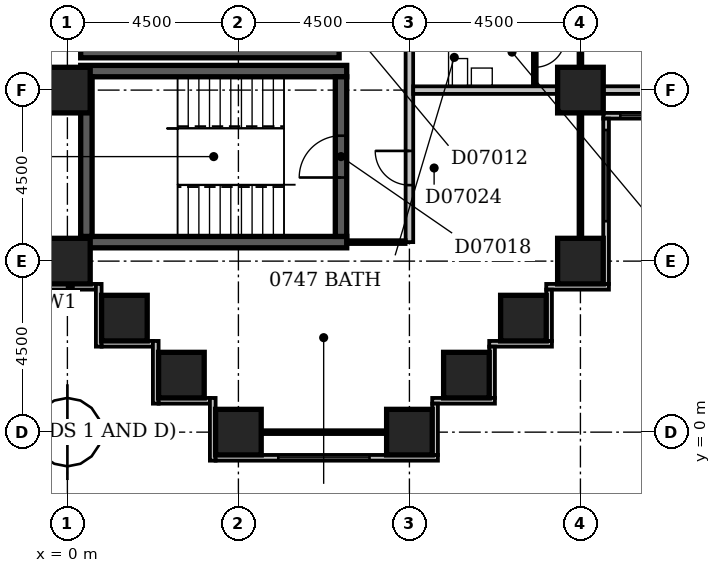
"""IFC4 building model, lengths in metres.
Left out: names, types, materials, properties, quantities, classifications, styles, units other than length and angle.
Written with IfcOpenShell. Run it as: python <this file> out.ifc"""

import sys

from ifc_helpers import new_model, si_unit, direction, frame, frame_2d, origin, origin_2d, place, context, subcontext, project, spatial, rectangle, extrude, element, fill, save


model = new_model("IFC4")
c1 = context("Model", 3, precision=1e-05, world=origin(), true_north=direction((0.0, 1.0)))
c2 = subcontext(c1, "Body", "Model", "MODEL_VIEW")
j1 = project(units=[si_unit("LENGTHUNIT", "METRE"), si_unit("PLANEANGLEUNIT", "RADIAN")], contexts=[c1])
p1 = place(None, origin())
s1 = spatial("IfcSite", under=j1, at=p1, CompositionType="ELEMENT")
p2 = place(p1, origin())
s2 = spatial("IfcBuilding", under=s1, at=p2, CompositionType="ELEMENT")
p3 = place(p2, frame((0.0, 0.0, 36.2)))
s3 = spatial("IfcBuildingStorey", under=s2, at=p3, CompositionType="ELEMENT", Elevation=36.2)
for number, where, z_axis, x_axis in (
    (1, (0.35, 5.0, -0.3), (0.0, 0.0, 1.0), (1.0, 0.0, 0.0)),
    (2, (0.35, 9.5, -0.3), (0.0, 0.0, 1.0), (1.0, 0.0, 0.0)),
):
    element("IfcWall", number, at=place(p3, frame(where, z_axis=z_axis, x_axis=x_axis)), inside=s3, PredefinedType="SHEAR", context=c2, shape_type="SweptSolid", body=[
        extrude(rectangle(XDim=7.0, YDim=0.3, at=frame_2d((3.5, 0.0))), origin(), (0.0, 0.0, 1.0), 3.6),
    ])
p4 = place(p3, frame((0.35, 10.0, -0.3), z_axis=(0.0, 0.0, 1.0), x_axis=(1.0, 0.0, 0.0)))
e3 = element("IfcWall", 3, at=p4, inside=s3, PredefinedType="SHEAR", context=c2, shape_type="SweptSolid", body=[
    extrude(rectangle(XDim=6.8, YDim=0.3, at=frame_2d((3.4, 0.0))), origin(), (0.0, 0.0, 1.0), 3.6),
])
p5 = place(p3, frame((0.5, 5.15, -0.3), z_axis=(0.0, 0.0, 1.0), x_axis=(0.0, 1.0, 0.0)))
e4 = element("IfcWall", 4, at=p5, inside=s3, PredefinedType="SHEAR", context=c2, shape_type="SweptSolid", body=[
    extrude(rectangle(XDim=4.2, YDim=0.3, at=frame_2d((2.1, 0.0))), origin(), (0.0, 0.0, 1.0), 3.6),
])
p6 = place(p3, frame((7.2, 5.15, -0.3), z_axis=(0.0, 0.0, 1.0), x_axis=(0.0, 1.0, 0.0)))
e5 = element("IfcWall", 5, at=p6, inside=s3, PredefinedType="SHEAR", context=c2, shape_type="SweptSolid", body=[
    extrude(rectangle(XDim=4.2, YDim=0.3, at=frame_2d((2.1, 0.0))), origin(), (0.0, 0.0, 1.0), 3.6),
])
p7 = place(p6, frame((1.55, 0.0, 0.3)))
e6 = element("IfcOpeningElement", 6, at=p7, cuts=e5, PredefinedType="OPENING", context=c2, shape_type="SweptSolid", body=[
    extrude(rectangle(XDim=1.1, YDim=2.1, at=frame_2d((0.55, 1.05))), frame((0.0, 0.162, 0.0), z_axis=(0.0, -1.0, 0.0), x_axis=(1.0, 0.0, 0.0)), (0.0, 0.0, 1.0), 0.324),
])
for number, where, z_axis, x_axis in (
    (7, (4.5, 0.0, -0.3), (0.0, 0.0, 1.0), (1.0, 0.0, 0.0)),
    (8, (9.0, 0.0, -0.3), (0.0, 0.0, 1.0), (1.0, 0.0, 0.0)),
    (9, (3.0, 1.5, -0.3), (0.0, 0.0, 1.0), (1.0, 0.0, 0.0)),
    (10, (10.5, 1.5, -0.3), (0.0, 0.0, 1.0), (1.0, 0.0, 0.0)),
    (11, (1.5, 3.0, -0.3), (0.0, 0.0, 1.0), (1.0, 0.0, 0.0)),
    (12, (12.0, 3.0, -0.3), (0.0, 0.0, 1.0), (1.0, 0.0, 0.0)),
    (13, (0.0, 4.5, -0.3), (0.0, 0.0, 1.0), (1.0, 0.0, 0.0)),
    (14, (13.5, 4.5, -0.3), (0.0, 0.0, 1.0), (1.0, 0.0, 0.0)),
    (15, (0.0, 9.0, -0.3), (0.0, 0.0, 1.0), (1.0, 0.0, 0.0)),
    (16, (13.5, 9.0, -0.3), (0.0, 0.0, 1.0), (1.0, 0.0, 0.0)),
):
    element("IfcColumn", number, at=place(p3, frame(where, z_axis=z_axis, x_axis=x_axis)), inside=s3, PredefinedType="COLUMN", context=c2, shape_type="SweptSolid", body=[
        extrude(rectangle(XDim=1.2, YDim=1.2, at=origin_2d()), origin(), (0.0, 0.0, 1.0), 3.6),
    ])
p8 = place(p3, frame((9.675, -0.6, 0.0), z_axis=(0.0, 0.0, 1.0), x_axis=(0.0, 1.0, 0.0)))
e17 = element("IfcWall", 17, at=p8, inside=s3, PredefinedType="STANDARD", context=c2, shape_type="SweptSolid", body=[
    extrude(rectangle(XDim=1.35, YDim=0.15, at=frame_2d((0.675, 0.0))), origin(), (0.0, 0.0, 1.0), 2.7),
])
p9 = place(p3, frame((9.6, 0.825, 0.0), z_axis=(0.0, 0.0, 1.0), x_axis=(1.0, 0.0, 0.0)))
e18 = element("IfcWall", 18, at=p9, inside=s3, PredefinedType="STANDARD", context=c2, shape_type="SweptSolid", body=[
    extrude(rectangle(XDim=1.65, YDim=0.15, at=frame_2d((0.825, 0.0))), origin(), (0.0, 0.0, 1.0), 2.7),
])
p10 = place(p3, frame((11.175, 0.9, 0.0), z_axis=(0.0, 0.0, 1.0), x_axis=(0.0, 1.0, 0.0)))
e19 = element("IfcWall", 19, at=p10, inside=s3, PredefinedType="STANDARD", context=c2, shape_type="SweptSolid", body=[
    extrude(rectangle(XDim=1.35, YDim=0.15, at=frame_2d((0.675, 0.0))), origin(), (0.0, 0.0, 1.0), 2.7),
])
p11 = place(p3, frame((11.1, 2.325, 0.0), z_axis=(0.0, 0.0, 1.0), x_axis=(1.0, 0.0, 0.0)))
e20 = element("IfcWall", 20, at=p11, inside=s3, PredefinedType="STANDARD", context=c2, shape_type="SweptSolid", body=[
    extrude(rectangle(XDim=1.65, YDim=0.15, at=frame_2d((0.825, 0.0))), origin(), (0.0, 0.0, 1.0), 2.7),
])
p12 = place(p3, frame((12.675, 2.4, 0.0), z_axis=(0.0, 0.0, 1.0), x_axis=(0.0, 1.0, 0.0)))
e21 = element("IfcWall", 21, at=p12, inside=s3, PredefinedType="STANDARD", context=c2, shape_type="SweptSolid", body=[
    extrude(rectangle(XDim=1.35, YDim=0.15, at=frame_2d((0.675, 0.0))), origin(), (0.0, 0.0, 1.0), 2.7),
])
p13 = place(p3, frame((12.6, 3.825, 0.0), z_axis=(0.0, 0.0, 1.0), x_axis=(1.0, 0.0, 0.0)))
e22 = element("IfcWall", 22, at=p13, inside=s3, PredefinedType="STANDARD", context=c2, shape_type="SweptSolid", body=[
    extrude(rectangle(XDim=1.65, YDim=0.15, at=frame_2d((0.825, 0.0))), origin(), (0.0, 0.0, 1.0), 2.7),
])
p14 = place(p3, frame((14.175, 3.9, 0.0), z_axis=(0.0, 0.0, 1.0), x_axis=(0.0, 1.0, 0.0)))
e23 = element("IfcWall", 23, at=p14, inside=s3, PredefinedType="STANDARD", context=c2, shape_type="SweptSolid", body=[
    extrude(rectangle(XDim=4.35, YDim=0.15, at=frame_2d((2.175, 0.0))), origin(), (0.0, 0.0, 1.0), 2.7),
])
p15 = place(p14, frame((1.65, 0.0, 0.6)))
e24 = element("IfcOpeningElement", 24, at=p15, cuts=e23, PredefinedType="OPENING", context=c2, shape_type="SweptSolid", body=[
    extrude(rectangle(XDim=2.4, YDim=1.8, at=frame_2d((1.2, 0.9))), frame((0.0, 0.087, 0.0), z_axis=(0.0, -1.0, 0.0), x_axis=(1.0, 0.0, 0.0)), (0.0, 0.0, 1.0), 0.174),
])
p16 = place(p3, frame((14.1, 8.325, 0.0), z_axis=(0.0, 0.0, 1.0), x_axis=(1.0, 0.0, 0.0)))
e25 = element("IfcWall", 25, at=p16, inside=s3, PredefinedType="STANDARD", context=c2, shape_type="SweptSolid", body=[
    extrude(rectangle(XDim=4.65, YDim=0.15, at=frame_2d((2.325, 0.0))), origin(), (0.0, 0.0, 1.0), 2.7),
])
p17 = place(p16, frame((0.45, 0.0, 0.6)))
e26 = element("IfcOpeningElement", 26, at=p17, cuts=e25, PredefinedType="OPENING", context=c2, shape_type="SweptSolid", body=[
    extrude(rectangle(XDim=2.4, YDim=1.8, at=frame_2d((1.2, 0.9))), frame((0.0, 0.087, 0.0), z_axis=(0.0, -1.0, 0.0), x_axis=(1.0, 0.0, 0.0)), (0.0, 0.0, 1.0), 0.174),
])
p18 = place(p3, frame((-0.6, 3.825, 0.0), z_axis=(0.0, 0.0, 1.0), x_axis=(1.0, 0.0, 0.0)))
e27 = element("IfcWall", 27, at=p18, inside=s3, PredefinedType="STANDARD", context=c2, shape_type="SweptSolid", body=[
    extrude(rectangle(XDim=1.35, YDim=0.15, at=frame_2d((0.675, 0.0))), origin(), (0.0, 0.0, 1.0), 2.7),
])
p19 = place(p3, frame((0.825, 3.9, 0.0), z_axis=(0.0, 0.0, 1.0), x_axis=(0.0, -1.0, 0.0)))
e28 = element("IfcWall", 28, at=p19, inside=s3, PredefinedType="STANDARD", context=c2, shape_type="SweptSolid", body=[
    extrude(rectangle(XDim=1.65, YDim=0.15, at=frame_2d((0.825, 0.0))), origin(), (0.0, 0.0, 1.0), 2.7),
])
p20 = place(p3, frame((0.9, 2.325, 0.0), z_axis=(0.0, 0.0, 1.0), x_axis=(1.0, 0.0, 0.0)))
e29 = element("IfcWall", 29, at=p20, inside=s3, PredefinedType="STANDARD", context=c2, shape_type="SweptSolid", body=[
    extrude(rectangle(XDim=1.35, YDim=0.15, at=frame_2d((0.675, 0.0))), origin(), (0.0, 0.0, 1.0), 2.7),
])
p21 = place(p3, frame((2.325, 2.4, 0.0), z_axis=(0.0, 0.0, 1.0), x_axis=(0.0, -1.0, 0.0)))
e30 = element("IfcWall", 30, at=p21, inside=s3, PredefinedType="STANDARD", context=c2, shape_type="SweptSolid", body=[
    extrude(rectangle(XDim=1.65, YDim=0.15, at=frame_2d((0.825, 0.0))), origin(), (0.0, 0.0, 1.0), 2.7),
])
p22 = place(p3, frame((2.4, 0.825, 0.0), z_axis=(0.0, 0.0, 1.0), x_axis=(1.0, 0.0, 0.0)))
e31 = element("IfcWall", 31, at=p22, inside=s3, PredefinedType="STANDARD", context=c2, shape_type="SweptSolid", body=[
    extrude(rectangle(XDim=1.35, YDim=0.15, at=frame_2d((0.675, 0.0))), origin(), (0.0, 0.0, 1.0), 2.7),
])
p23 = place(p3, frame((3.825, 0.9, 0.0), z_axis=(0.0, 0.0, 1.0), x_axis=(0.0, -1.0, 0.0)))
e32 = element("IfcWall", 32, at=p23, inside=s3, PredefinedType="STANDARD", context=c2, shape_type="SweptSolid", body=[
    extrude(rectangle(XDim=1.65, YDim=0.15, at=frame_2d((0.825, 0.0))), origin(), (0.0, 0.0, 1.0), 2.7),
])
p24 = place(p3, frame((3.9, -0.675, 0.0), z_axis=(0.0, 0.0, 1.0), x_axis=(1.0, 0.0, 0.0)))
e33 = element("IfcWall", 33, at=p24, inside=s3, PredefinedType="STANDARD", context=c2, shape_type="SweptSolid", body=[
    extrude(rectangle(XDim=5.85, YDim=0.15, at=frame_2d((2.925, 0.0))), origin(), (0.0, 0.0, 1.0), 2.7),
])
p25 = place(p24, frame((1.65, 0.0, 0.6)))
e34 = element("IfcOpeningElement", 34, at=p25, cuts=e33, PredefinedType="OPENING", context=c2, shape_type="SweptSolid", body=[
    extrude(rectangle(XDim=2.4, YDim=1.8, at=frame_2d((1.2, 0.9))), frame((0.0, 0.087, 0.0), z_axis=(0.0, -1.0, 0.0), x_axis=(1.0, 0.0, 0.0)), (0.0, 0.0, 1.0), 0.174),
])
p26 = place(p3, frame((5.1, 0.0, 0.0), z_axis=(0.0, 0.0, 1.0), x_axis=(1.0, 0.0, 0.0)))
e35 = element("IfcWall", 35, at=p26, inside=s3, PredefinedType="PARTITIONING", context=c2, shape_type="SweptSolid", body=[
    extrude(rectangle(XDim=3.3, YDim=0.1, at=frame_2d((1.65, 0.0))), origin(), (0.0, 0.0, 1.0), 2.7),
])
p27 = place(p3, frame((0.0, 4.4, 0.0), z_axis=(0.0, 0.0, 1.0), x_axis=(0.0, 1.0, 0.0)))
e36 = element("IfcWall", 36, at=p27, inside=s3, PredefinedType="PARTITIONING", context=c2, shape_type="SweptSolid", body=[
    extrude(rectangle(XDim=0.7, YDim=0.1, at=frame_2d((0.35, 0.0))), origin(), (0.0, 0.0, 1.0), 2.7),
])
p28 = place(p3, frame((7.349, 5.0, 0.0), z_axis=(0.0, 0.0, 1.0), x_axis=(1.0, 0.0, 0.0)))
e37 = element("IfcWall", 37, at=p28, inside=s3, PredefinedType="PARTITIONING", context=c2, shape_type="SweptSolid", body=[
    extrude(rectangle(XDim=1.551, YDim=0.1, at=frame_2d((0.775, 0.0))), origin(), (0.0, 0.0, 1.0), 3.3),
])
p29 = place(p3, frame((9.0, 5.0, 0.0), z_axis=(0.0, 0.0, 1.0), x_axis=(0.0, 1.0, 0.0)))
e38 = element("IfcWall", 38, at=p29, inside=s3, PredefinedType="PARTITIONING", context=c2, shape_type="SweptSolid", body=[
    extrude(rectangle(XDim=44.5, YDim=0.2, at=frame_2d((22.25, 0.0))), origin(), (0.0, 0.0, 1.0), 3.3),
])
p30 = place(p29, frame((24.7, 0.0, 0.0)))
e39 = element("IfcOpeningElement", 39, at=p30, cuts=e38, PredefinedType="OPENING", context=c2, shape_type="SweptSolid", body=[
    extrude(rectangle(XDim=1.0, YDim=2.1, at=frame_2d((0.5, 1.05))), frame((0.0, 0.112, 0.0), z_axis=(0.0, -1.0, 0.0), x_axis=(1.0, 0.0, 0.0)), (0.0, 0.0, 1.0), 0.224),
])
p31 = place(p29, frame((13.3, 0.0, 0.0)))
e40 = element("IfcOpeningElement", 40, at=p31, cuts=e38, PredefinedType="OPENING", context=c2, shape_type="SweptSolid", body=[
    extrude(rectangle(XDim=1.0, YDim=2.1, at=frame_2d((0.5, 1.05))), frame((0.0, 0.112, 0.0), z_axis=(0.0, -1.0, 0.0), x_axis=(1.0, 0.0, 0.0)), (0.0, 0.0, 1.0), 0.224),
])
p32 = place(p29, frame((10.45, 0.0, 0.0)))
e41 = element("IfcOpeningElement", 41, at=p32, cuts=e38, PredefinedType="OPENING", context=c2, shape_type="SweptSolid", body=[
    extrude(rectangle(XDim=1.0, YDim=2.1, at=frame_2d((0.5, 1.05))), frame((0.0, 0.112, 0.0), z_axis=(0.0, -1.0, 0.0), x_axis=(1.0, 0.0, 0.0)), (0.0, 0.0, 1.0), 0.224),
])
p33 = place(p29, frame((5.95, 0.0, 0.0)))
e42 = element("IfcOpeningElement", 42, at=p33, cuts=e38, PredefinedType="OPENING", context=c2, shape_type="SweptSolid", body=[
    extrude(rectangle(XDim=1.0, YDim=2.1, at=frame_2d((0.5, 1.05))), frame((0.0, 0.112, 0.0), z_axis=(0.0, -1.0, 0.0), x_axis=(1.0, 0.0, 0.0)), (0.0, 0.0, 1.0), 0.224),
])
p34 = place(p29, frame((37.25, 0.0, 0.0)))
e43 = element("IfcOpeningElement", 43, at=p34, cuts=e38, PredefinedType="OPENING", context=c2, shape_type="SweptSolid", body=[
    extrude(rectangle(XDim=0.9, YDim=2.1, at=frame_2d((0.45, 1.05))), frame((0.0, 0.112, 0.0), z_axis=(0.0, -1.0, 0.0), x_axis=(1.0, 0.0, 0.0)), (0.0, 0.0, 1.0), 0.224),
])
p35 = place(p29, frame((1.5, 0.0, 0.0)))
e44 = element("IfcOpeningElement", 44, at=p35, cuts=e38, PredefinedType="OPENING", context=c2, shape_type="SweptSolid", body=[
    extrude(rectangle(XDim=0.9, YDim=2.1, at=frame_2d((0.45, 1.05))), frame((0.0, 0.112, 0.0), z_axis=(0.0, -1.0, 0.0), x_axis=(1.0, 0.0, 0.0)), (0.0, 0.0, 1.0), 0.224),
])
p36 = place(p3, frame((13.5, 5.1, 0.0), z_axis=(0.0, 0.0, 1.0), x_axis=(0.0, 1.0, 0.0)))
e45 = element("IfcWall", 45, at=p36, inside=s3, PredefinedType="PARTITIONING", context=c2, shape_type="SweptSolid", body=[
    extrude(rectangle(XDim=3.3, YDim=0.1, at=frame_2d((1.65, 0.0))), origin(), (0.0, 0.0, 1.0), 2.7),
])
p37 = place(p3, frame((9.1, 9.0, 0.0), z_axis=(0.0, 0.0, 1.0), x_axis=(1.0, 0.0, 0.0)))
e46 = element("IfcWall", 46, at=p37, inside=s3, PredefinedType="PARTITIONING", context=c2, shape_type="SweptSolid", body=[
    extrude(rectangle(XDim=3.8, YDim=0.2, at=frame_2d((1.9, 0.0))), origin(), (0.0, 0.0, 1.0), 3.3),
])
p38 = place(p3, frame((14.1, 9.0, 0.0), z_axis=(0.0, 0.0, 1.0), x_axis=(1.0, 0.0, 0.0)))
e47 = element("IfcWall", 47, at=p38, inside=s3, PredefinedType="PARTITIONING", context=c2, shape_type="SweptSolid", body=[
    extrude(rectangle(XDim=3.3, YDim=0.2, at=frame_2d((1.65, 0.0))), origin(), (0.0, 0.0, 1.0), 2.7),
])
p39 = place(p3, frame((12.3, 9.1, 0.0), z_axis=(0.0, 0.0, 1.0), x_axis=(0.0, 1.0, 0.0)))
e48 = element("IfcWall", 48, at=p39, inside=s3, PredefinedType="PARTITIONING", context=c2, shape_type="SweptSolid", body=[
    extrude(rectangle(XDim=1.6, YDim=0.1, at=frame_2d((0.8, 0.0))), origin(), (0.0, 0.0, 1.0), 3.3),
])
p40 = place(p39, frame((0.5, 0.0, 0.0)))
e49 = element("IfcOpeningElement", 49, at=p40, cuts=e48, PredefinedType="OPENING", context=c2, shape_type="SweptSolid", body=[
    extrude(rectangle(XDim=0.8, YDim=2.1, at=frame_2d((0.4, 1.05))), frame((0.0, 0.062, 0.0), z_axis=(0.0, -1.0, 0.0), x_axis=(1.0, 0.0, 0.0)), (0.0, 0.0, 1.0), 0.124),
])
p41 = place(p3, frame((13.5, 9.6, 0.0), z_axis=(0.0, 0.0, 1.0), x_axis=(0.0, 1.0, 0.0)))
e50 = element("IfcWall", 50, at=p41, inside=s3, PredefinedType="PARTITIONING", context=c2, shape_type="SweptSolid", body=[
    extrude(rectangle(XDim=8.3, YDim=0.1, at=frame_2d((4.15, 0.0))), origin(), (0.0, 0.0, 1.0), 3.3),
])
p42 = place(p41, frame((5.7, 0.0, 0.0)))
e51 = element("IfcOpeningElement", 51, at=p42, cuts=e50, PredefinedType="OPENING", context=c2, shape_type="SweptSolid", body=[
    extrude(rectangle(XDim=0.9, YDim=2.1, at=frame_2d((0.45, 1.05))), frame((0.0, 0.062, 0.0), z_axis=(0.0, -1.0, 0.0), x_axis=(1.0, 0.0, 0.0)), (0.0, 0.0, 1.0), 0.124),
])
p43 = place(p41, frame((1.2, 0.0, 0.0)))
e52 = element("IfcOpeningElement", 52, at=p43, cuts=e50, PredefinedType="OPENING", context=c2, shape_type="SweptSolid", body=[
    extrude(rectangle(XDim=0.9, YDim=2.1, at=frame_2d((0.45, 1.05))), frame((0.0, 0.062, 0.0), z_axis=(0.0, -1.0, 0.0), x_axis=(1.0, 0.0, 0.0)), (0.0, 0.0, 1.0), 0.124),
])
p44 = place(p15, origin())
e53 = element("IfcWindow", 53, at=p44, inside=s3, PartitioningType="SINGLE_PANEL", PredefinedType="WINDOW", context=c2, shape_type="SweptSolid", body=[
    extrude(rectangle(XDim=2.4, YDim=1.8, at=frame_2d((1.2, 0.9))), frame((0.0, 0.03, 0.0), z_axis=(0.0, -1.0, 0.0), x_axis=(1.0, 0.0, 0.0)), (0.0, 0.0, 1.0), 0.06),
])
fill(e24, e53)
p45 = place(p17, origin())
e54 = element("IfcWindow", 54, at=p45, inside=s3, PartitioningType="SINGLE_PANEL", PredefinedType="WINDOW", context=c2, shape_type="SweptSolid", body=[
    extrude(rectangle(XDim=2.4, YDim=1.8, at=frame_2d((1.2, 0.9))), frame((0.0, 0.03, 0.0), z_axis=(0.0, -1.0, 0.0), x_axis=(1.0, 0.0, 0.0)), (0.0, 0.0, 1.0), 0.06),
])
fill(e26, e54)
p46 = place(p25, origin())
e55 = element("IfcWindow", 55, at=p46, inside=s3, PartitioningType="SINGLE_PANEL", PredefinedType="WINDOW", context=c2, shape_type="SweptSolid", body=[
    extrude(rectangle(XDim=2.4, YDim=1.8, at=frame_2d((1.2, 0.9))), frame((0.0, 0.03, 0.0), z_axis=(0.0, -1.0, 0.0), x_axis=(1.0, 0.0, 0.0)), (0.0, 0.0, 1.0), 0.06),
])
fill(e34, e55)
p47 = place(p7, origin())
e56 = element("IfcDoor", 56, at=p47, inside=s3, OperationType="SINGLE_SWING_LEFT", PredefinedType="DOOR", context=c2, shape_type="SweptSolid", body=[
    extrude(rectangle(XDim=1.1, YDim=2.1, at=frame_2d((0.55, 1.05))), frame((0.0, 0.025, 0.0), z_axis=(0.0, -1.0, 0.0), x_axis=(1.0, 0.0, 0.0)), (0.0, 0.0, 1.0), 0.05),
])
fill(e6, e56)
p48 = place(p35, frame((0.9, 0.0, 0.0), z_axis=(0.0, 0.0, 1.0), x_axis=(-1.0, 0.0, 0.0)))
e57 = element("IfcDoor", 57, at=p48, inside=s3, OperationType="SINGLE_SWING_LEFT", PredefinedType="DOOR", context=c2, shape_type="SweptSolid", body=[
    extrude(rectangle(XDim=0.9, YDim=2.1, at=frame_2d((0.45, 1.05))), frame((0.0, 0.025, 0.0), z_axis=(0.0, -1.0, 0.0), x_axis=(1.0, 0.0, 0.0)), (0.0, 0.0, 1.0), 0.05),
])
fill(e44, e57)
p49 = place(p40, origin())
e58 = element("IfcDoor", 58, at=p49, inside=s3, OperationType="SINGLE_SWING_RIGHT", PredefinedType="DOOR", context=c2, shape_type="SweptSolid", body=[
    extrude(rectangle(XDim=0.8, YDim=2.1, at=frame_2d((0.4, 1.05))), frame((0.0, 0.025, 0.0), z_axis=(0.0, -1.0, 0.0), x_axis=(1.0, 0.0, 0.0)), (0.0, 0.0, 1.0), 0.05),
])
fill(e49, e58)
save(model, sys.argv[1])
